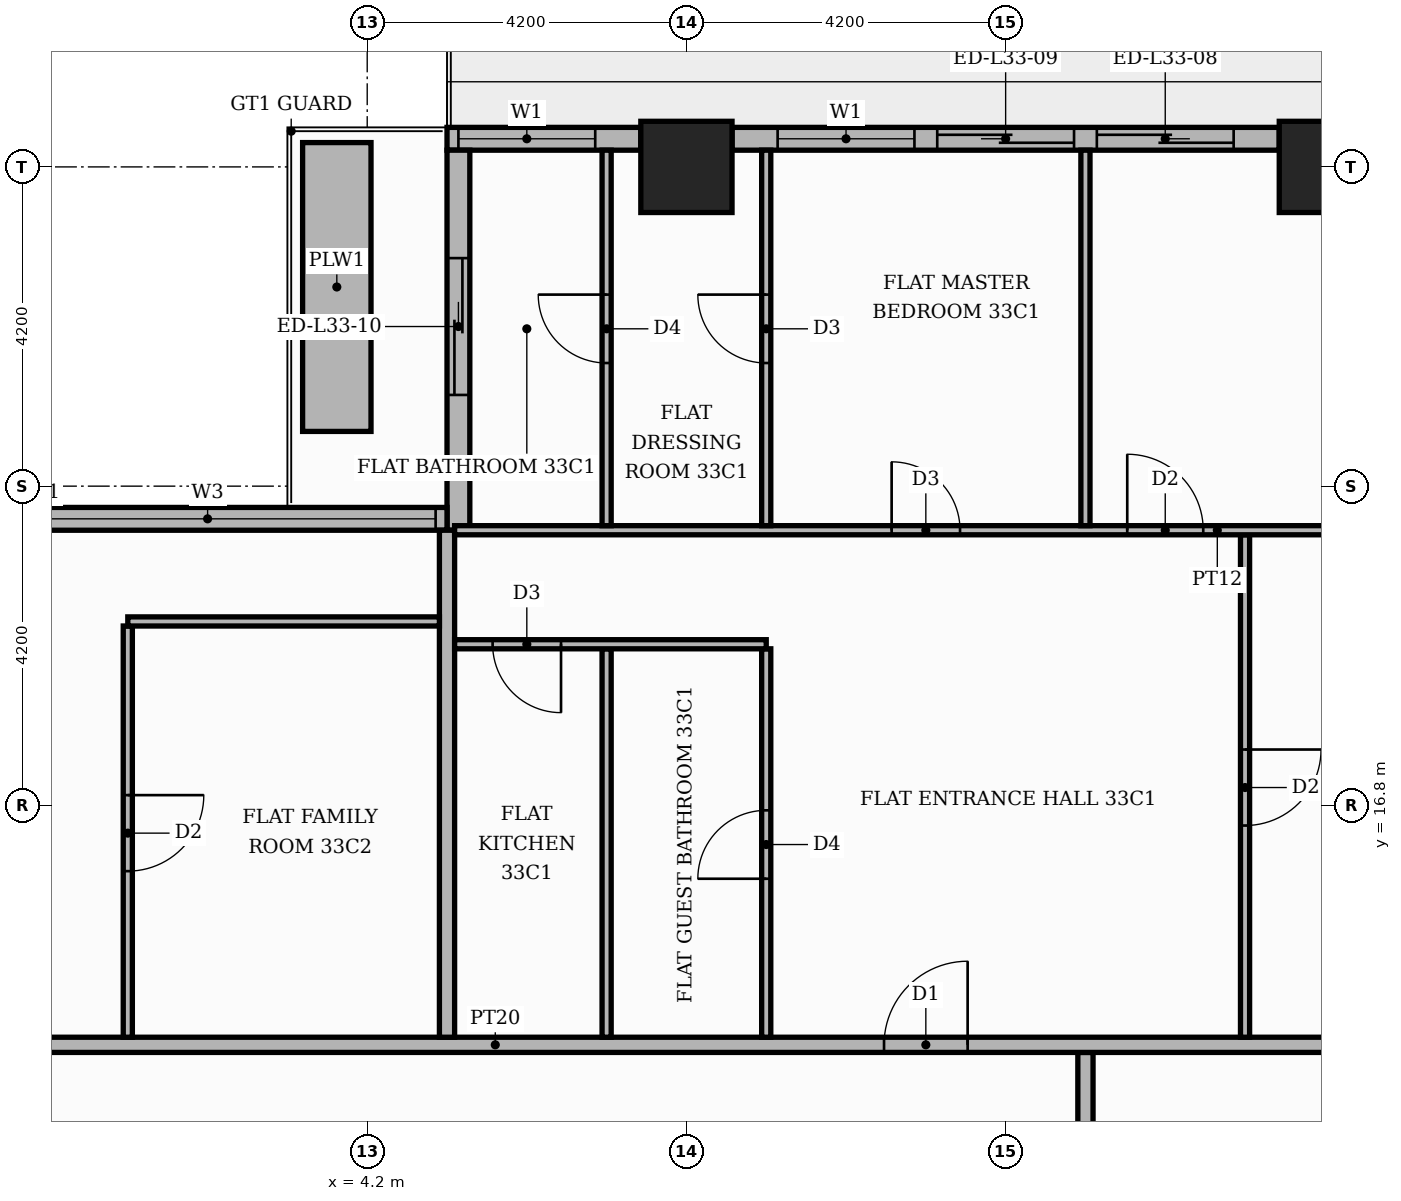
"""IFC4 building model, lengths in metres.
Left out: names, types, materials, properties, quantities, classifications, styles, units other than length and angle.
Written with IfcOpenShell. Run it as: python <this file> out.ifc"""

import sys

from ifc_helpers import new_model, si_unit, direction, frame, frame_2d, origin, origin_2d, place, context, subcontext, project, spatial, rectangle, extrude, element, fill, save


model = new_model("IFC4")
c1 = context("Model", 3, precision=1e-05, world=origin(), true_north=direction((0.0, 1.0)))
c2 = subcontext(c1, "Body", "Model", "MODEL_VIEW")
j1 = project(units=[si_unit("LENGTHUNIT", "METRE"), si_unit("PLANEANGLEUNIT", "RADIAN")], contexts=[c1])
p1 = place(None, origin())
s1 = spatial("IfcSite", under=j1, at=p1, CompositionType="ELEMENT")
p2 = place(p1, origin())
s2 = spatial("IfcBuilding", under=s1, at=p2, CompositionType="ELEMENT")
p3 = place(p2, frame((0.0, 0.0, 141.6)))
s3 = spatial("IfcBuildingStorey", under=s2, at=p3, CompositionType="ELEMENT", Elevation=141.6)
for number, where, z_axis, x_axis in (
    (1, (8.4, 25.2, 0.0), (0.0, 0.0, 1.0), (1.0, 0.0, 0.0)),
    (2, (16.8, 25.2, 0.0), (0.0, 0.0, 1.0), (1.0, 0.0, 0.0)),
):
    element("IfcColumn", number, at=place(p3, frame(where, z_axis=z_axis, x_axis=x_axis)), inside=s3, PredefinedType="COLUMN", context=c2, shape_type="SweptSolid", body=[
        extrude(rectangle(XDim=1.2, YDim=1.2, at=origin_2d()), origin(), (0.0, 0.0, 1.0), 3.9),
    ])
p4 = place(p3, frame((16.2, 25.57, 0.0), z_axis=(0.0, 0.0, 1.0), x_axis=(-1.0, 0.0, 0.0)))
e3 = element("IfcWall", 3, at=p4, inside=s3, PredefinedType="STANDARD", context=c2, shape_type="SweptSolid", body=[
    extrude(rectangle(XDim=7.2, YDim=0.3, at=frame_2d((3.6, 0.0))), origin(), (0.0, 0.0, 1.0), 3.48),
])
p5 = place(p4, frame((0.6, 0.0, 0.0)))
e4 = element("IfcOpeningElement", 4, at=p5, cuts=e3, PredefinedType="OPENING", context=c2, shape_type="SweptSolid", body=[
    extrude(rectangle(XDim=1.8, YDim=2.4, at=frame_2d((0.9, 1.2))), frame((0.0, 0.16, 0.0), z_axis=(0.0, -1.0, 0.0), x_axis=(1.0, 0.0, 0.0)), (0.0, 0.0, 1.0), 0.32),
])
p6 = place(p4, frame((2.7, 0.0, 0.0)))
e5 = element("IfcOpeningElement", 5, at=p6, cuts=e3, PredefinedType="OPENING", context=c2, shape_type="SweptSolid", body=[
    extrude(rectangle(XDim=1.8, YDim=2.4, at=frame_2d((0.9, 1.2))), frame((0.0, 0.16, 0.0), z_axis=(0.0, -1.0, 0.0), x_axis=(1.0, 0.0, 0.0)), (0.0, 0.0, 1.0), 0.32),
])
p7 = place(p4, frame((4.8, 0.0, 0.9)))
e6 = element("IfcOpeningElement", 6, at=p7, cuts=e3, PredefinedType="OPENING", context=c2, shape_type="SweptSolid", body=[
    extrude(rectangle(XDim=1.8, YDim=2.1, at=frame_2d((0.9, 1.05))), frame((0.0, 0.16, 0.0), z_axis=(0.0, -1.0, 0.0), x_axis=(1.0, 0.0, 0.0)), (0.0, 0.0, 1.0), 0.32),
])
p8 = place(p3, frame((7.8, 25.57, 0.0), z_axis=(0.0, 0.0, 1.0), x_axis=(-1.0, 0.0, 0.0)))
e7 = element("IfcWall", 7, at=p8, inside=s3, PredefinedType="STANDARD", context=c2, shape_type="SweptSolid", body=[
    extrude(rectangle(XDim=2.55, YDim=0.3, at=frame_2d((1.275, 0.0))), origin(), (0.0, 0.0, 1.0), 3.48),
])
p9 = place(p8, frame((0.6, 0.0, 0.9)))
e8 = element("IfcOpeningElement", 8, at=p9, cuts=e7, PredefinedType="OPENING", context=c2, shape_type="SweptSolid", body=[
    extrude(rectangle(XDim=1.8, YDim=2.1, at=frame_2d((0.9, 1.05))), frame((0.0, 0.16, 0.0), z_axis=(0.0, -1.0, 0.0), x_axis=(1.0, 0.0, 0.0)), (0.0, 0.0, 1.0), 0.32),
])
p10 = place(p3, frame((5.4, 25.42, 0.0), z_axis=(0.0, 0.0, 1.0), x_axis=(0.0, -1.0, 0.0)))
e9 = element("IfcWall", 9, at=p10, inside=s3, PredefinedType="STANDARD", context=c2, shape_type="SweptSolid", body=[
    extrude(rectangle(XDim=5.0, YDim=0.3, at=frame_2d((2.5, 0.0))), origin(), (0.0, 0.0, 1.0), 3.48),
])
p11 = place(p10, frame((1.42, 0.0, 0.0)))
e10 = element("IfcOpeningElement", 10, at=p11, cuts=e9, PredefinedType="OPENING", context=c2, shape_type="SweptSolid", body=[
    extrude(rectangle(XDim=1.8, YDim=2.4, at=frame_2d((0.9, 1.2))), frame((0.0, 0.16, 0.0), z_axis=(0.0, -1.0, 0.0), x_axis=(1.0, 0.0, 0.0)), (0.0, 0.0, 1.0), 0.32),
])
p12 = place(p3, frame((5.25, 20.57, 0.0), z_axis=(0.0, 0.0, 1.0), x_axis=(-1.0, 0.0, 0.0)))
e11 = element("IfcWall", 11, at=p12, inside=s3, PredefinedType="STANDARD", context=c2, shape_type="SweptSolid", body=[
    extrude(rectangle(XDim=10.8, YDim=0.3, at=frame_2d((5.4, 0.0))), origin(), (0.0, 0.0, 1.0), 3.48),
])
p13 = place(p12, frame((0.15, 0.0, 0.9)))
e12 = element("IfcOpeningElement", 12, at=p13, cuts=e11, PredefinedType="OPENING", context=c2, shape_type="SweptSolid", body=[
    extrude(rectangle(XDim=6.0, YDim=2.1, at=frame_2d((3.0, 1.05))), frame((0.0, 0.16, 0.0), z_axis=(0.0, -1.0, 0.0), x_axis=(1.0, 0.0, 0.0)), (0.0, 0.0, 1.0), 0.32),
])
p14 = place(p12, frame((6.45, 0.0, 0.9)))
e13 = element("IfcOpeningElement", 13, at=p14, cuts=e11, PredefinedType="OPENING", context=c2, shape_type="SweptSolid", body=[
    extrude(rectangle(XDim=3.9, YDim=2.1, at=frame_2d((1.95, 1.05))), frame((0.0, 0.16, 0.0), z_axis=(0.0, -1.0, 0.0), x_axis=(1.0, 0.0, 0.0)), (0.0, 0.0, 1.0), 0.32),
])
p15 = place(p3, frame((3.8, 21.72, 0.0), z_axis=(0.0, 0.0, 1.0), x_axis=(0.0, 1.0, 0.0)))
e14 = element("IfcWall", 14, at=p15, inside=s3, PredefinedType="MOVABLE", context=c2, shape_type="SweptSolid", body=[
    extrude(rectangle(XDim=3.8, YDim=0.9, at=frame_2d((1.9, 0.0))), origin(), (0.0, 0.0, 1.0), 0.6),
])
p16 = place(p3, frame((13.65, 11.1, 0.0), z_axis=(0.0, 0.0, 1.0), x_axis=(0.0, 1.0, 0.0)))
e15 = element("IfcWall", 15, at=p16, inside=s3, PredefinedType="PARTITIONING", context=c2, shape_type="SweptSolid", body=[
    extrude(rectangle(XDim=2.45, YDim=0.2, at=frame_2d((1.225, 0.0))), origin(), (0.0, 0.0, 1.0), 3.48),
])
p17 = place(p3, frame((-13.65, 13.65, 0.0), z_axis=(0.0, 0.0, 1.0), x_axis=(1.0, 0.0, 0.0)))
e16 = element("IfcWall", 16, at=p17, inside=s3, PredefinedType="PARTITIONING", context=c2, shape_type="SweptSolid", body=[
    extrude(rectangle(XDim=39.07, YDim=0.2, at=frame_2d((19.535, 0.0))), origin(), (0.0, 0.0, 1.0), 3.48),
])
p18 = place(p17, frame((24.65, 0.0, 0.0)))
e17 = element("IfcOpeningElement", 17, at=p18, cuts=e16, PredefinedType="OPENING", context=c2, shape_type="SweptSolid", body=[
    extrude(rectangle(XDim=1.1, YDim=2.4, at=frame_2d((0.55, 1.2))), frame((0.0, 0.11, 0.0), z_axis=(0.0, -1.0, 0.0), x_axis=(1.0, 0.0, 0.0)), (0.0, 0.0, 1.0), 0.22),
])
p19 = place(p17, frame((12.05, 0.0, 0.0)))
e18 = element("IfcOpeningElement", 18, at=p19, cuts=e16, PredefinedType="OPENING", context=c2, shape_type="SweptSolid", body=[
    extrude(rectangle(XDim=1.1, YDim=2.4, at=frame_2d((0.55, 1.2))), frame((0.0, 0.11, 0.0), z_axis=(0.0, -1.0, 0.0), x_axis=(1.0, 0.0, 0.0)), (0.0, 0.0, 1.0), 0.22),
])
p20 = place(p3, frame((1.05, 13.75, 0.0), z_axis=(0.0, 0.0, 1.0), x_axis=(0.0, 1.0, 0.0)))
e19 = element("IfcWall", 19, at=p20, inside=s3, PredefinedType="PARTITIONING", context=c2, shape_type="SweptSolid", body=[
    extrude(rectangle(XDim=5.41, YDim=0.12, at=frame_2d((2.705, 0.0))), origin(), (0.0, 0.0, 1.0), 3.48),
])
p21 = place(p20, frame((2.185, 0.0, 0.0)))
e20 = element("IfcOpeningElement", 20, at=p21, cuts=e19, PredefinedType="OPENING", context=c2, shape_type="SweptSolid", body=[
    extrude(rectangle(XDim=1.0, YDim=2.1, at=frame_2d((0.5, 1.05))), frame((0.0, 0.07, 0.0), z_axis=(0.0, -1.0, 0.0), x_axis=(1.0, 0.0, 0.0)), (0.0, 0.0, 1.0), 0.14),
])
p22 = place(p3, frame((5.25, 13.75, 0.0), z_axis=(0.0, 0.0, 1.0), x_axis=(0.0, 1.0, 0.0)))
e21 = element("IfcWall", 21, at=p22, inside=s3, PredefinedType="PARTITIONING", context=c2, shape_type="SweptSolid", body=[
    extrude(rectangle(XDim=6.67, YDim=0.2, at=frame_2d((3.335, 0.0))), origin(), (0.0, 0.0, 1.0), 3.48),
])
p23 = place(p3, frame((7.35, 13.75, 0.0), z_axis=(0.0, 0.0, 1.0), x_axis=(0.0, 1.0, 0.0)))
e22 = element("IfcWall", 22, at=p23, inside=s3, PredefinedType="PARTITIONING", context=c2, shape_type="SweptSolid", body=[
    extrude(rectangle(XDim=5.11, YDim=0.12, at=frame_2d((2.555, 0.0))), origin(), (0.0, 0.0, 1.0), 3.48),
])
p24 = place(p3, frame((9.45, 13.75, 0.0), z_axis=(0.0, 0.0, 1.0), x_axis=(0.0, 1.0, 0.0)))
e23 = element("IfcWall", 23, at=p24, inside=s3, PredefinedType="PARTITIONING", context=c2, shape_type="SweptSolid", body=[
    extrude(rectangle(XDim=5.11, YDim=0.12, at=frame_2d((2.555, 0.0))), origin(), (0.0, 0.0, 1.0), 3.48),
])
p25 = place(p24, frame((2.085, 0.0, 0.0)))
e24 = element("IfcOpeningElement", 24, at=p25, cuts=e23, PredefinedType="OPENING", context=c2, shape_type="SweptSolid", body=[
    extrude(rectangle(XDim=0.9, YDim=2.1, at=frame_2d((0.45, 1.05))), frame((0.0, 0.07, 0.0), z_axis=(0.0, -1.0, 0.0), x_axis=(1.0, 0.0, 0.0)), (0.0, 0.0, 1.0), 0.14),
])
p26 = place(p3, frame((15.75, 13.75, 0.0), z_axis=(0.0, 0.0, 1.0), x_axis=(0.0, 1.0, 0.0)))
e25 = element("IfcWall", 25, at=p26, inside=s3, PredefinedType="PARTITIONING", context=c2, shape_type="SweptSolid", body=[
    extrude(rectangle(XDim=6.61, YDim=0.12, at=frame_2d((3.305, 0.0))), origin(), (0.0, 0.0, 1.0), 3.48),
])
p27 = place(p26, frame((2.785, 0.0, 0.0)))
e26 = element("IfcOpeningElement", 26, at=p27, cuts=e25, PredefinedType="OPENING", context=c2, shape_type="SweptSolid", body=[
    extrude(rectangle(XDim=1.0, YDim=2.1, at=frame_2d((0.5, 1.05))), frame((0.0, 0.07, 0.0), z_axis=(0.0, -1.0, 0.0), x_axis=(1.0, 0.0, 0.0)), (0.0, 0.0, 1.0), 0.14),
])
p28 = place(p3, frame((5.35, 18.92, 0.0), z_axis=(0.0, 0.0, 1.0), x_axis=(1.0, 0.0, 0.0)))
e27 = element("IfcWall", 27, at=p28, inside=s3, PredefinedType="PARTITIONING", context=c2, shape_type="SweptSolid", body=[
    extrude(rectangle(XDim=4.1, YDim=0.12, at=frame_2d((2.05, 0.0))), origin(), (0.0, 0.0, 1.0), 3.48),
])
p29 = place(p28, frame((0.5, 0.0, 0.0)))
e28 = element("IfcOpeningElement", 28, at=p29, cuts=e27, PredefinedType="OPENING", context=c2, shape_type="SweptSolid", body=[
    extrude(rectangle(XDim=0.9, YDim=2.1, at=frame_2d((0.45, 1.05))), frame((0.0, 0.07, 0.0), z_axis=(0.0, -1.0, 0.0), x_axis=(1.0, 0.0, 0.0)), (0.0, 0.0, 1.0), 0.14),
])
p30 = place(p3, frame((1.05, 19.22, 0.0), z_axis=(0.0, 0.0, 1.0), x_axis=(1.0, 0.0, 0.0)))
e29 = element("IfcWall", 29, at=p30, inside=s3, PredefinedType="PARTITIONING", context=c2, shape_type="SweptSolid", body=[
    extrude(rectangle(XDim=4.1, YDim=0.12, at=frame_2d((2.05, 0.0))), origin(), (0.0, 0.0, 1.0), 3.48),
])
p31 = place(p3, frame((5.35, 20.42, 0.0), z_axis=(0.0, 0.0, 1.0), x_axis=(1.0, 0.0, 0.0)))
e30 = element("IfcWall", 30, at=p31, inside=s3, PredefinedType="PARTITIONING", context=c2, shape_type="SweptSolid", body=[
    extrude(rectangle(XDim=20.07, YDim=0.12, at=frame_2d((10.035, 0.0))), origin(), (0.0, 0.0, 1.0), 3.48),
])
p32 = place(p31, frame((8.85, 0.0, 0.0)))
e31 = element("IfcOpeningElement", 31, at=p32, cuts=e30, PredefinedType="OPENING", context=c2, shape_type="SweptSolid", body=[
    extrude(rectangle(XDim=1.0, YDim=2.1, at=frame_2d((0.5, 1.05))), frame((0.0, 0.07, 0.0), z_axis=(0.0, -1.0, 0.0), x_axis=(1.0, 0.0, 0.0)), (0.0, 0.0, 1.0), 0.14),
])
p33 = place(p31, frame((5.75, 0.0, 0.0)))
e32 = element("IfcOpeningElement", 32, at=p33, cuts=e30, PredefinedType="OPENING", context=c2, shape_type="SweptSolid", body=[
    extrude(rectangle(XDim=0.9, YDim=2.1, at=frame_2d((0.45, 1.05))), frame((0.0, 0.07, 0.0), z_axis=(0.0, -1.0, 0.0), x_axis=(1.0, 0.0, 0.0)), (0.0, 0.0, 1.0), 0.14),
])
p34 = place(p3, frame((7.35, 20.48, 0.0), z_axis=(0.0, 0.0, 1.0), x_axis=(0.0, 1.0, 0.0)))
e33 = element("IfcWall", 33, at=p34, inside=s3, PredefinedType="PARTITIONING", context=c2, shape_type="SweptSolid", body=[
    extrude(rectangle(XDim=4.94, YDim=0.12, at=frame_2d((2.47, 0.0))), origin(), (0.0, 0.0, 1.0), 3.48),
])
p35 = place(p34, frame((2.14, 0.0, 0.0)))
e34 = element("IfcOpeningElement", 34, at=p35, cuts=e33, PredefinedType="OPENING", context=c2, shape_type="SweptSolid", body=[
    extrude(rectangle(XDim=0.9, YDim=2.1, at=frame_2d((0.45, 1.05))), frame((0.0, 0.07, 0.0), z_axis=(0.0, -1.0, 0.0), x_axis=(1.0, 0.0, 0.0)), (0.0, 0.0, 1.0), 0.14),
])
p36 = place(p3, frame((9.45, 20.48, 0.0), z_axis=(0.0, 0.0, 1.0), x_axis=(0.0, 1.0, 0.0)))
e35 = element("IfcWall", 35, at=p36, inside=s3, PredefinedType="PARTITIONING", context=c2, shape_type="SweptSolid", body=[
    extrude(rectangle(XDim=4.94, YDim=0.12, at=frame_2d((2.47, 0.0))), origin(), (0.0, 0.0, 1.0), 3.48),
])
p37 = place(p36, frame((2.14, 0.0, 0.0)))
e36 = element("IfcOpeningElement", 36, at=p37, cuts=e35, PredefinedType="OPENING", context=c2, shape_type="SweptSolid", body=[
    extrude(rectangle(XDim=0.9, YDim=2.1, at=frame_2d((0.45, 1.05))), frame((0.0, 0.07, 0.0), z_axis=(0.0, -1.0, 0.0), x_axis=(1.0, 0.0, 0.0)), (0.0, 0.0, 1.0), 0.14),
])
p38 = place(p3, frame((13.65, 20.48, 0.0), z_axis=(0.0, 0.0, 1.0), x_axis=(0.0, 1.0, 0.0)))
e37 = element("IfcWall", 37, at=p38, inside=s3, PredefinedType="PARTITIONING", context=c2, shape_type="SweptSolid", body=[
    extrude(rectangle(XDim=4.94, YDim=0.12, at=frame_2d((2.47, 0.0))), origin(), (0.0, 0.0, 1.0), 3.48),
])
p39 = place(p5, origin())
e38 = element("IfcDoor", 38, at=p39, inside=s3, OperationType="SLIDING_TO_LEFT", PredefinedType="DOOR", context=c2, shape_type="SweptSolid", body=[
    extrude(rectangle(XDim=1.8, YDim=2.4, at=frame_2d((0.9, 1.2))), frame((0.0, 0.025, 0.0), z_axis=(0.0, -1.0, 0.0), x_axis=(1.0, 0.0, 0.0)), (0.0, 0.0, 1.0), 0.05),
])
fill(e4, e38)
p40 = place(p6, origin())
e39 = element("IfcDoor", 39, at=p40, inside=s3, OperationType="SLIDING_TO_RIGHT", PredefinedType="DOOR", context=c2, shape_type="SweptSolid", body=[
    extrude(rectangle(XDim=1.8, YDim=2.4, at=frame_2d((0.9, 1.2))), frame((0.0, 0.025, 0.0), z_axis=(0.0, -1.0, 0.0), x_axis=(1.0, 0.0, 0.0)), (0.0, 0.0, 1.0), 0.05),
])
fill(e5, e39)
p41 = place(p7, origin())
e40 = element("IfcWindow", 40, at=p41, inside=s3, PartitioningType="SINGLE_PANEL", PredefinedType="WINDOW", context=c2, shape_type="SweptSolid", body=[
    extrude(rectangle(XDim=1.8, YDim=2.1, at=frame_2d((0.9, 1.05))), frame((0.0, 0.03, 0.0), z_axis=(0.0, -1.0, 0.0), x_axis=(1.0, 0.0, 0.0)), (0.0, 0.0, 1.0), 0.06),
])
fill(e6, e40)
p42 = place(p9, origin())
e41 = element("IfcWindow", 41, at=p42, inside=s3, PartitioningType="SINGLE_PANEL", PredefinedType="WINDOW", context=c2, shape_type="SweptSolid", body=[
    extrude(rectangle(XDim=1.8, YDim=2.1, at=frame_2d((0.9, 1.05))), frame((0.0, 0.03, 0.0), z_axis=(0.0, -1.0, 0.0), x_axis=(1.0, 0.0, 0.0)), (0.0, 0.0, 1.0), 0.06),
])
fill(e8, e41)
p43 = place(p11, origin())
e42 = element("IfcDoor", 42, at=p43, inside=s3, OperationType="SLIDING_TO_LEFT", PredefinedType="DOOR", context=c2, shape_type="SweptSolid", body=[
    extrude(rectangle(XDim=1.8, YDim=2.4, at=frame_2d((0.9, 1.2))), frame((0.0, 0.025, 0.0), z_axis=(0.0, -1.0, 0.0), x_axis=(1.0, 0.0, 0.0)), (0.0, 0.0, 1.0), 0.05),
])
fill(e10, e42)
p44 = place(p13, origin())
e43 = element("IfcWindow", 43, at=p44, inside=s3, PartitioningType="SINGLE_PANEL", PredefinedType="WINDOW", context=c2, shape_type="SweptSolid", body=[
    extrude(rectangle(XDim=6.0, YDim=2.1, at=frame_2d((3.0, 1.05))), frame((0.0, 0.03, 0.0), z_axis=(0.0, -1.0, 0.0), x_axis=(1.0, 0.0, 0.0)), (0.0, 0.0, 1.0), 0.06),
])
fill(e12, e43)
p45 = place(p18, origin())
e44 = element("IfcDoor", 44, at=p45, inside=s3, OperationType="SINGLE_SWING_RIGHT", PredefinedType="DOOR", context=c2, shape_type="SweptSolid", body=[
    extrude(rectangle(XDim=1.1, YDim=2.4, at=frame_2d((0.55, 1.2))), frame((0.0, 0.025, 0.0), z_axis=(0.0, -1.0, 0.0), x_axis=(1.0, 0.0, 0.0)), (0.0, 0.0, 1.0), 0.05),
])
fill(e17, e44)
p46 = place(p27, frame((1.0, 0.0, 0.0), z_axis=(0.0, 0.0, 1.0), x_axis=(-1.0, 0.0, 0.0)))
e45 = element("IfcDoor", 45, at=p46, inside=s3, OperationType="SINGLE_SWING_RIGHT", PredefinedType="DOOR", context=c2, shape_type="SweptSolid", body=[
    extrude(rectangle(XDim=1.0, YDim=2.1, at=frame_2d((0.5, 1.05))), frame((0.0, 0.025, 0.0), z_axis=(0.0, -1.0, 0.0), x_axis=(1.0, 0.0, 0.0)), (0.0, 0.0, 1.0), 0.05),
])
fill(e26, e45)
p47 = place(p25, origin())
e46 = element("IfcDoor", 46, at=p47, inside=s3, OperationType="SINGLE_SWING_LEFT", PredefinedType="DOOR", context=c2, shape_type="SweptSolid", body=[
    extrude(rectangle(XDim=0.9, YDim=2.1, at=frame_2d((0.45, 1.05))), frame((0.0, 0.025, 0.0), z_axis=(0.0, -1.0, 0.0), x_axis=(1.0, 0.0, 0.0)), (0.0, 0.0, 1.0), 0.05),
])
fill(e24, e46)
p48 = place(p29, frame((0.9, 0.0, 0.0), z_axis=(0.0, 0.0, 1.0), x_axis=(-1.0, 0.0, 0.0)))
e47 = element("IfcDoor", 47, at=p48, inside=s3, OperationType="SINGLE_SWING_RIGHT", PredefinedType="DOOR", context=c2, shape_type="SweptSolid", body=[
    extrude(rectangle(XDim=0.9, YDim=2.1, at=frame_2d((0.45, 1.05))), frame((0.0, 0.025, 0.0), z_axis=(0.0, -1.0, 0.0), x_axis=(1.0, 0.0, 0.0)), (0.0, 0.0, 1.0), 0.05),
])
fill(e28, e47)
p49 = place(p32, origin())
e48 = element("IfcDoor", 48, at=p49, inside=s3, OperationType="SINGLE_SWING_LEFT", PredefinedType="DOOR", context=c2, shape_type="SweptSolid", body=[
    extrude(rectangle(XDim=1.0, YDim=2.1, at=frame_2d((0.5, 1.05))), frame((0.0, 0.025, 0.0), z_axis=(0.0, -1.0, 0.0), x_axis=(1.0, 0.0, 0.0)), (0.0, 0.0, 1.0), 0.05),
])
fill(e31, e48)
p50 = place(p33, origin())
e49 = element("IfcDoor", 49, at=p50, inside=s3, OperationType="SINGLE_SWING_LEFT", PredefinedType="DOOR", context=c2, shape_type="SweptSolid", body=[
    extrude(rectangle(XDim=0.9, YDim=2.1, at=frame_2d((0.45, 1.05))), frame((0.0, 0.025, 0.0), z_axis=(0.0, -1.0, 0.0), x_axis=(1.0, 0.0, 0.0)), (0.0, 0.0, 1.0), 0.05),
])
fill(e32, e49)
p51 = place(p37, origin())
e50 = element("IfcDoor", 50, at=p51, inside=s3, OperationType="SINGLE_SWING_RIGHT", PredefinedType="DOOR", context=c2, shape_type="SweptSolid", body=[
    extrude(rectangle(XDim=0.9, YDim=2.1, at=frame_2d((0.45, 1.05))), frame((0.0, 0.025, 0.0), z_axis=(0.0, -1.0, 0.0), x_axis=(1.0, 0.0, 0.0)), (0.0, 0.0, 1.0), 0.05),
])
fill(e36, e50)
p52 = place(p35, origin())
e51 = element("IfcDoor", 51, at=p52, inside=s3, OperationType="SINGLE_SWING_RIGHT", PredefinedType="DOOR", context=c2, shape_type="SweptSolid", body=[
    extrude(rectangle(XDim=0.9, YDim=2.1, at=frame_2d((0.45, 1.05))), frame((0.0, 0.025, 0.0), z_axis=(0.0, -1.0, 0.0), x_axis=(1.0, 0.0, 0.0)), (0.0, 0.0, 1.0), 0.05),
])
fill(e34, e51)
p53 = place(p21, frame((1.0, 0.0, 0.0), z_axis=(0.0, 0.0, 1.0), x_axis=(-1.0, 0.0, 0.0)))
e52 = element("IfcDoor", 52, at=p53, inside=s3, OperationType="SINGLE_SWING_RIGHT", PredefinedType="DOOR", context=c2, shape_type="SweptSolid", body=[
    extrude(rectangle(XDim=1.0, YDim=2.1, at=frame_2d((0.5, 1.05))), frame((0.0, 0.025, 0.0), z_axis=(0.0, -1.0, 0.0), x_axis=(1.0, 0.0, 0.0)), (0.0, 0.0, 1.0), 0.05),
])
fill(e20, e52)
save(model, sys.argv[1])
